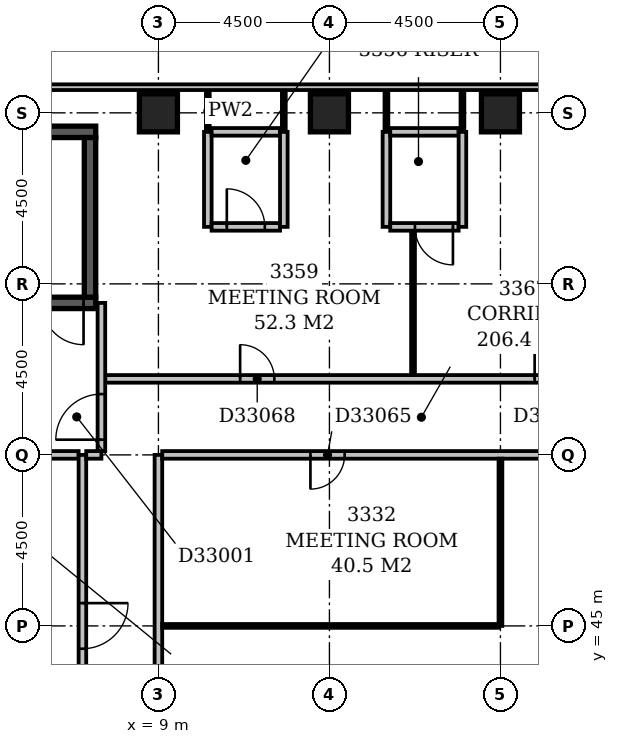
"""IFC4 building model, lengths in metres.
Left out: names, types, materials, properties, quantities, classifications, styles, units other than length and angle.
Written with IfcOpenShell. Run it as: python <this file> out.ifc"""

import sys

from ifc_helpers import new_model, si_unit, direction, frame, frame_2d, origin, origin_2d, place, context, subcontext, project, spatial, rectangle, extrude, element, fill, save


model = new_model("IFC4")
c1 = context("Model", 3, precision=1e-05, world=origin(), true_north=direction((0.0, 1.0)))
c2 = subcontext(c1, "Body", "Model", "MODEL_VIEW")
j1 = project(units=[si_unit("LENGTHUNIT", "METRE"), si_unit("PLANEANGLEUNIT", "RADIAN")], contexts=[c1])
p1 = place(None, origin())
s1 = spatial("IfcSite", under=j1, at=p1, CompositionType="ELEMENT")
p2 = place(p1, origin())
s2 = spatial("IfcBuilding", under=s1, at=p2, CompositionType="ELEMENT")
p3 = place(p2, frame((0.0, 0.0, 134.0)))
s3 = spatial("IfcBuildingStorey", under=s2, at=p3, CompositionType="ELEMENT", Elevation=134.0)
p4 = place(p3, frame((0.35, 53.5, -0.3), z_axis=(0.0, 0.0, 1.0), x_axis=(1.0, 0.0, 0.0)))
e1 = element("IfcWall", 1, at=p4, inside=s3, PredefinedType="SHEAR", context=c2, shape_type="SweptSolid", body=[
    extrude(rectangle(XDim=7.0, YDim=0.3, at=frame_2d((3.5, 0.0))), origin(), (0.0, 0.0, 1.0), 3.6),
])
p5 = place(p4, frame((5.58, 0.0, 0.3)))
e2 = element("IfcOpeningElement", 2, at=p5, cuts=e1, PredefinedType="OPENING", context=c2, shape_type="SweptSolid", body=[
    extrude(rectangle(XDim=1.1, YDim=2.1, at=frame_2d((0.55, 1.05))), frame((0.0, 0.162, 0.0), z_axis=(0.0, -1.0, 0.0), x_axis=(1.0, 0.0, 0.0)), (0.0, 0.0, 1.0), 0.324),
])
p6 = place(p3, frame((0.35, 58.0, -0.3), z_axis=(0.0, 0.0, 1.0), x_axis=(1.0, 0.0, 0.0)))
e3 = element("IfcWall", 3, at=p6, inside=s3, PredefinedType="SHEAR", context=c2, shape_type="SweptSolid", body=[
    extrude(rectangle(XDim=7.0, YDim=0.3, at=frame_2d((3.5, 0.0))), origin(), (0.0, 0.0, 1.0), 3.6),
])
p7 = place(p3, frame((7.2, 53.65, -0.3), z_axis=(0.0, 0.0, 1.0), x_axis=(0.0, 1.0, 0.0)))
e4 = element("IfcWall", 4, at=p7, inside=s3, PredefinedType="SHEAR", context=c2, shape_type="SweptSolid", body=[
    extrude(rectangle(XDim=4.2, YDim=0.3, at=frame_2d((2.1, 0.0))), origin(), (0.0, 0.0, 1.0), 3.6),
])
for number, where, z_axis, x_axis in (
    (5, (9.0, 58.5, -0.3), (0.0, 0.0, 1.0), (1.0, 0.0, 0.0)),
    (6, (13.5, 58.5, -0.3), (0.0, 0.0, 1.0), (1.0, 0.0, 0.0)),
    (7, (18.0, 58.5, -0.3), (0.0, 0.0, 1.0), (1.0, 0.0, 0.0)),
):
    element("IfcColumn", number, at=place(p3, frame(where, z_axis=z_axis, x_axis=x_axis)), inside=s3, PredefinedType="COLUMN", context=c2, shape_type="SweptSolid", body=[
        extrude(rectangle(XDim=1.0, YDim=1.0, at=origin_2d()), origin(), (0.0, 0.0, 1.0), 3.6),
    ])
p8 = place(p3, frame((68.1, 59.175, 0.0), z_axis=(0.0, 0.0, 1.0), x_axis=(-1.0, 0.0, 0.0)))
e8 = element("IfcWall", 8, at=p8, inside=s3, PredefinedType="STANDARD", context=c2, shape_type="SweptSolid", body=[
    extrude(rectangle(XDim=68.85, YDim=0.15, at=frame_2d((34.425, 0.0))), origin(), (0.0, 0.0, 1.0), 2.7),
])
p9 = place(p3, frame((7.0, 34.6, 0.0), z_axis=(0.0, 0.0, 1.0), x_axis=(0.0, 1.0, 0.0)))
e9 = element("IfcWall", 9, at=p9, inside=s3, PredefinedType="PARTITIONING", context=c2, shape_type="SweptSolid", body=[
    extrude(rectangle(XDim=14.9, YDim=0.2, at=frame_2d((7.45, 0.0))), origin(), (0.0, 0.0, 1.0), 3.3),
])
p10 = place(p9, frame((2.8, 0.0, 0.0)))
e10 = element("IfcOpeningElement", 10, at=p10, cuts=e9, PredefinedType="OPENING", context=c2, shape_type="SweptSolid", body=[
    extrude(rectangle(XDim=1.2, YDim=2.1, at=frame_2d((0.6, 1.05))), frame((0.0, 0.112, 0.0), z_axis=(0.0, -1.0, 0.0), x_axis=(1.0, 0.0, 0.0)), (0.0, 0.0, 1.0), 0.224),
])
p11 = place(p9, frame((9.8, 0.0, 0.0)))
e11 = element("IfcOpeningElement", 11, at=p11, cuts=e9, PredefinedType="OPENING", context=c2, shape_type="SweptSolid", body=[
    extrude(rectangle(XDim=1.2, YDim=2.1, at=frame_2d((0.6, 1.05))), frame((0.0, 0.112, 0.0), z_axis=(0.0, -1.0, 0.0), x_axis=(1.0, 0.0, 0.0)), (0.0, 0.0, 1.0), 0.224),
])
p12 = place(p3, frame((4.6, 49.5, 0.0), z_axis=(0.0, 0.0, 1.0), x_axis=(1.0, 0.0, 0.0)))
e12 = element("IfcWall", 12, at=p12, inside=s3, PredefinedType="PARTITIONING", context=c2, shape_type="SweptSolid", body=[
    extrude(rectangle(XDim=2.3, YDim=0.2, at=frame_2d((1.15, 0.0))), origin(), (0.0, 0.0, 1.0), 3.3),
])
p13 = place(p3, frame((7.1, 49.5, 0.0), z_axis=(0.0, 0.0, 1.0), x_axis=(1.0, 0.0, 0.0)))
e13 = element("IfcWall", 13, at=p13, inside=s3, PredefinedType="PARTITIONING", context=c2, shape_type="SweptSolid", body=[
    extrude(rectangle(XDim=0.4, YDim=0.2, at=frame_2d((0.2, 0.0))), origin(), (0.0, 0.0, 1.0), 3.3),
])
p14 = place(p3, frame((7.5, 49.6, 0.0), z_axis=(0.0, 0.0, 1.0), x_axis=(0.0, 1.0, 0.0)))
e14 = element("IfcWall", 14, at=p14, inside=s3, PredefinedType="PARTITIONING", context=c2, shape_type="SweptSolid", body=[
    extrude(rectangle(XDim=3.9, YDim=0.2, at=frame_2d((1.95, 0.0))), origin(), (0.0, 0.0, 1.0), 3.3),
])
p15 = place(p14, frame((0.3, 0.0, 0.0)))
e15 = element("IfcOpeningElement", 15, at=p15, cuts=e14, PredefinedType="OPENING", context=c2, shape_type="SweptSolid", body=[
    extrude(rectangle(XDim=1.2, YDim=2.1, at=frame_2d((0.6, 1.05))), frame((0.0, 0.112, 0.0), z_axis=(0.0, -1.0, 0.0), x_axis=(1.0, 0.0, 0.0)), (0.0, 0.0, 1.0), 0.224),
])
p16 = place(p3, frame((9.0, 34.75, 0.0), z_axis=(0.0, 0.0, 1.0), x_axis=(0.0, 1.0, 0.0)))
e16 = element("IfcWall", 16, at=p16, inside=s3, PredefinedType="PARTITIONING", context=c2, shape_type="SweptSolid", body=[
    extrude(rectangle(XDim=14.75, YDim=0.2, at=frame_2d((7.375, 0.0))), origin(), (0.0, 0.0, 1.0), 3.3),
])
p17 = place(p16, frame((5.25, 0.0, 0.0)))
e17 = element("IfcOpeningElement", 17, at=p17, cuts=e16, PredefinedType="OPENING", context=c2, shape_type="SweptSolid", body=[
    extrude(rectangle(XDim=0.9, YDim=2.1, at=frame_2d((0.45, 1.05))), frame((0.0, 0.112, 0.0), z_axis=(0.0, -1.0, 0.0), x_axis=(1.0, 0.0, 0.0)), (0.0, 0.0, 1.0), 0.224),
])
p18 = place(p3, frame((9.1, 45.0, 0.0), z_axis=(0.0, 0.0, 1.0), x_axis=(1.0, 0.0, 0.0)))
e18 = element("IfcWall", 18, at=p18, inside=s3, PredefinedType="PARTITIONING", context=c2, shape_type="SweptSolid", body=[
    extrude(rectangle(XDim=8.85, YDim=0.1, at=frame_2d((4.425, 0.0))), origin(), (0.0, 0.0, 1.0), 3.3),
])
p19 = place(p3, frame((18.0, 45.0, 0.0), z_axis=(0.0, 0.0, 1.0), x_axis=(0.0, 1.0, 0.0)))
e19 = element("IfcWall", 19, at=p19, inside=s3, PredefinedType="PARTITIONING", context=c2, shape_type="SweptSolid", body=[
    extrude(rectangle(XDim=4.4, YDim=0.1, at=frame_2d((2.2, 0.0))), origin(), (0.0, 0.0, 1.0), 3.3),
])
p20 = place(p3, frame((9.1, 49.5, 0.0), z_axis=(0.0, 0.0, 1.0), x_axis=(1.0, 0.0, 0.0)))
e20 = element("IfcWall", 20, at=p20, inside=s3, PredefinedType="PARTITIONING", context=c2, shape_type="SweptSolid", body=[
    extrude(rectangle(XDim=28.05, YDim=0.2, at=frame_2d((14.025, 0.0))), origin(), (0.0, 0.0, 1.0), 3.3),
])
p21 = place(p20, frame((20.0, 0.0, 0.0)))
e21 = element("IfcOpeningElement", 21, at=p21, cuts=e20, PredefinedType="OPENING", context=c2, shape_type="SweptSolid", body=[
    extrude(rectangle(XDim=1.0, YDim=2.1, at=frame_2d((0.5, 1.05))), frame((0.0, 0.112, 0.0), z_axis=(0.0, -1.0, 0.0), x_axis=(1.0, 0.0, 0.0)), (0.0, 0.0, 1.0), 0.224),
])
p22 = place(p20, frame((3.9, 0.0, 0.0)))
e22 = element("IfcOpeningElement", 22, at=p22, cuts=e20, PredefinedType="OPENING", context=c2, shape_type="SweptSolid", body=[
    extrude(rectangle(XDim=0.9, YDim=2.1, at=frame_2d((0.45, 1.05))), frame((0.0, 0.112, 0.0), z_axis=(0.0, -1.0, 0.0), x_axis=(1.0, 0.0, 0.0)), (0.0, 0.0, 1.0), 0.224),
])
p23 = place(p3, frame((7.6, 51.5, 0.0), z_axis=(0.0, 0.0, 1.0), x_axis=(1.0, 0.0, 0.0)))
e23 = element("IfcWall", 23, at=p23, inside=s3, PredefinedType="PARTITIONING", context=c2, shape_type="SweptSolid", body=[
    extrude(rectangle(XDim=15.3, YDim=0.2, at=frame_2d((7.65, 0.0))), origin(), (0.0, 0.0, 1.0), 3.3),
])
p24 = place(p23, frame((3.55, 0.0, 0.0)))
e24 = element("IfcOpeningElement", 24, at=p24, cuts=e23, PredefinedType="OPENING", context=c2, shape_type="SweptSolid", body=[
    extrude(rectangle(XDim=0.9, YDim=2.1, at=frame_2d((0.45, 1.05))), frame((0.0, 0.112, 0.0), z_axis=(0.0, -1.0, 0.0), x_axis=(1.0, 0.0, 0.0)), (0.0, 0.0, 1.0), 0.224),
])
p25 = place(p23, frame((11.3, 0.0, 0.0)))
e25 = element("IfcOpeningElement", 25, at=p25, cuts=e23, PredefinedType="OPENING", context=c2, shape_type="SweptSolid", body=[
    extrude(rectangle(XDim=0.9, YDim=2.1, at=frame_2d((0.45, 1.05))), frame((0.0, 0.112, 0.0), z_axis=(0.0, -1.0, 0.0), x_axis=(1.0, 0.0, 0.0)), (0.0, 0.0, 1.0), 0.224),
])
p26 = place(p3, frame((15.7, 51.6, 0.0), z_axis=(0.0, 0.0, 1.0), x_axis=(0.0, 1.0, 0.0)))
e26 = element("IfcWall", 26, at=p26, inside=s3, PredefinedType="PARTITIONING", context=c2, shape_type="SweptSolid", body=[
    extrude(rectangle(XDim=3.8, YDim=0.1, at=frame_2d((1.9, 0.0))), origin(), (0.0, 0.0, 1.0), 3.3),
])
p27 = place(p3, frame((10.3, 55.5, 0.0), z_axis=(0.0, 0.0, 1.0), x_axis=(0.0, 1.0, 0.0)))
e27 = element("IfcWall", 27, at=p27, inside=s3, PredefinedType="PARTITIONING", context=c2, shape_type="SweptSolid", body=[
    extrude(rectangle(XDim=2.5, YDim=0.2, at=frame_2d((1.25, 0.0))), origin(), (0.0, 0.0, 1.0), 3.3),
])
p28 = place(p3, frame((10.4, 55.5, 0.0), z_axis=(0.0, 0.0, 1.0), x_axis=(1.0, 0.0, 0.0)))
e28 = element("IfcWall", 28, at=p28, inside=s3, PredefinedType="PARTITIONING", context=c2, shape_type="SweptSolid", body=[
    extrude(rectangle(XDim=1.8, YDim=0.2, at=frame_2d((0.9, 0.0))), origin(), (0.0, 0.0, 1.0), 3.3),
])
p29 = place(p28, frame((0.4, 0.0, 0.0)))
e29 = element("IfcOpeningElement", 29, at=p29, cuts=e28, PredefinedType="OPENING", context=c2, shape_type="SweptSolid", body=[
    extrude(rectangle(XDim=1.0, YDim=2.1, at=frame_2d((0.5, 1.05))), frame((0.0, 0.112, 0.0), z_axis=(0.0, -1.0, 0.0), x_axis=(1.0, 0.0, 0.0)), (0.0, 0.0, 1.0), 0.224),
])
for number, where, z_axis, x_axis in (
    (30, (12.3, 55.5, 0.0), (0.0, 0.0, 1.0), (0.0, 1.0, 0.0)),
    (31, (15.0, 55.5, 0.0), (0.0, 0.0, 1.0), (0.0, 1.0, 0.0)),
):
    element("IfcWall", number, at=place(p3, frame(where, z_axis=z_axis, x_axis=x_axis)), inside=s3, PredefinedType="PARTITIONING", context=c2, shape_type="SweptSolid", body=[
        extrude(rectangle(XDim=2.5, YDim=0.2, at=frame_2d((1.25, 0.0))), origin(), (0.0, 0.0, 1.0), 3.3),
    ])
p30 = place(p3, frame((15.1, 55.5, 0.0), z_axis=(0.0, 0.0, 1.0), x_axis=(1.0, 0.0, 0.0)))
e32 = element("IfcWall", 32, at=p30, inside=s3, PredefinedType="PARTITIONING", context=c2, shape_type="SweptSolid", body=[
    extrude(rectangle(XDim=1.8, YDim=0.2, at=frame_2d((0.9, 0.0))), origin(), (0.0, 0.0, 1.0), 3.3),
])
p31 = place(p30, frame((0.65, 0.0, 0.0)))
e33 = element("IfcOpeningElement", 33, at=p31, cuts=e32, PredefinedType="OPENING", context=c2, shape_type="SweptSolid", body=[
    extrude(rectangle(XDim=1.0, YDim=2.1, at=frame_2d((0.5, 1.05))), frame((0.0, 0.112, 0.0), z_axis=(0.0, -1.0, 0.0), x_axis=(1.0, 0.0, 0.0)), (0.0, 0.0, 1.0), 0.224),
])
p32 = place(p3, frame((17.0, 55.5, 0.0), z_axis=(0.0, 0.0, 1.0), x_axis=(0.0, 1.0, 0.0)))
e34 = element("IfcWall", 34, at=p32, inside=s3, PredefinedType="PARTITIONING", context=c2, shape_type="SweptSolid", body=[
    extrude(rectangle(XDim=2.5, YDim=0.2, at=frame_2d((1.25, 0.0))), origin(), (0.0, 0.0, 1.0), 3.3),
])
p33 = place(p3, frame((10.3, 58.0, 0.0), z_axis=(0.0, 0.0, 1.0), x_axis=(0.0, 1.0, 0.0)))
e35 = element("IfcWall", 35, at=p33, inside=s3, PredefinedType="PARTITIONING", context=c2, shape_type="SweptSolid", body=[
    extrude(rectangle(XDim=1.1, YDim=0.1, at=frame_2d((0.55, 0.0))), origin(), (0.0, 0.0, 1.0), 3.3),
])
p34 = place(p3, frame((10.4, 58.0, 0.0), z_axis=(0.0, 0.0, 1.0), x_axis=(1.0, 0.0, 0.0)))
e36 = element("IfcWall", 36, at=p34, inside=s3, PredefinedType="PARTITIONING", context=c2, shape_type="SweptSolid", body=[
    extrude(rectangle(XDim=1.8, YDim=0.2, at=frame_2d((0.9, 0.0))), origin(), (0.0, 0.0, 1.0), 3.3),
])
for number, where, z_axis, x_axis in (
    (37, (12.3, 58.0, 0.0), (0.0, 0.0, 1.0), (0.0, 1.0, 0.0)),
    (38, (15.0, 58.0, 0.0), (0.0, 0.0, 1.0), (0.0, 1.0, 0.0)),
):
    element("IfcWall", number, at=place(p3, frame(where, z_axis=z_axis, x_axis=x_axis)), inside=s3, PredefinedType="PARTITIONING", context=c2, shape_type="SweptSolid", body=[
        extrude(rectangle(XDim=1.1, YDim=0.1, at=frame_2d((0.55, 0.0))), origin(), (0.0, 0.0, 1.0), 3.3),
    ])
p35 = place(p3, frame((15.1, 58.0, 0.0), z_axis=(0.0, 0.0, 1.0), x_axis=(1.0, 0.0, 0.0)))
e39 = element("IfcWall", 39, at=p35, inside=s3, PredefinedType="PARTITIONING", context=c2, shape_type="SweptSolid", body=[
    extrude(rectangle(XDim=1.8, YDim=0.2, at=frame_2d((0.9, 0.0))), origin(), (0.0, 0.0, 1.0), 3.3),
])
p36 = place(p3, frame((17.0, 58.0, 0.0), z_axis=(0.0, 0.0, 1.0), x_axis=(0.0, 1.0, 0.0)))
e40 = element("IfcWall", 40, at=p36, inside=s3, PredefinedType="PARTITIONING", context=c2, shape_type="SweptSolid", body=[
    extrude(rectangle(XDim=1.1, YDim=0.1, at=frame_2d((0.55, 0.0))), origin(), (0.0, 0.0, 1.0), 3.3),
])
p37 = place(p15, origin())
e41 = element("IfcDoor", 41, at=p37, inside=s3, OperationType="SINGLE_SWING_LEFT", PredefinedType="DOOR", context=c2, shape_type="SweptSolid", body=[
    extrude(rectangle(XDim=1.2, YDim=2.1, at=frame_2d((0.6, 1.05))), frame((0.0, 0.025, 0.0), z_axis=(0.0, -1.0, 0.0), x_axis=(1.0, 0.0, 0.0)), (0.0, 0.0, 1.0), 0.05),
])
fill(e15, e41)
p38 = place(p11, origin())
e42 = element("IfcDoor", 42, at=p38, inside=s3, OperationType="SINGLE_SWING_RIGHT", PredefinedType="DOOR", context=c2, shape_type="SweptSolid", body=[
    extrude(rectangle(XDim=1.2, YDim=2.1, at=frame_2d((0.6, 1.05))), frame((0.0, 0.025, 0.0), z_axis=(0.0, -1.0, 0.0), x_axis=(1.0, 0.0, 0.0)), (0.0, 0.0, 1.0), 0.05),
])
fill(e11, e42)
p39 = place(p5, origin())
e43 = element("IfcDoor", 43, at=p39, inside=s3, OperationType="SINGLE_SWING_RIGHT", PredefinedType="DOOR", context=c2, shape_type="SweptSolid", body=[
    extrude(rectangle(XDim=1.1, YDim=2.1, at=frame_2d((0.55, 1.05))), frame((0.0, 0.025, 0.0), z_axis=(0.0, -1.0, 0.0), x_axis=(1.0, 0.0, 0.0)), (0.0, 0.0, 1.0), 0.05),
])
fill(e2, e43)
p40 = place(p22, frame((0.9, 0.0, 0.0), z_axis=(0.0, 0.0, 1.0), x_axis=(-1.0, 0.0, 0.0)))
e44 = element("IfcDoor", 44, at=p40, inside=s3, OperationType="SINGLE_SWING_RIGHT", PredefinedType="DOOR", context=c2, shape_type="SweptSolid", body=[
    extrude(rectangle(XDim=0.9, YDim=2.1, at=frame_2d((0.45, 1.05))), frame((0.0, 0.025, 0.0), z_axis=(0.0, -1.0, 0.0), x_axis=(1.0, 0.0, 0.0)), (0.0, 0.0, 1.0), 0.05),
])
fill(e22, e44)
p41 = place(p24, origin())
e45 = element("IfcDoor", 45, at=p41, inside=s3, OperationType="SINGLE_SWING_LEFT", PredefinedType="DOOR", context=c2, shape_type="SweptSolid", body=[
    extrude(rectangle(XDim=0.9, YDim=2.1, at=frame_2d((0.45, 1.05))), frame((0.0, 0.025, 0.0), z_axis=(0.0, -1.0, 0.0), x_axis=(1.0, 0.0, 0.0)), (0.0, 0.0, 1.0), 0.05),
])
fill(e24, e45)
p42 = place(p25, origin())
e46 = element("IfcDoor", 46, at=p42, inside=s3, OperationType="SINGLE_SWING_LEFT", PredefinedType="DOOR", context=c2, shape_type="SweptSolid", body=[
    extrude(rectangle(XDim=0.9, YDim=2.1, at=frame_2d((0.45, 1.05))), frame((0.0, 0.025, 0.0), z_axis=(0.0, -1.0, 0.0), x_axis=(1.0, 0.0, 0.0)), (0.0, 0.0, 1.0), 0.05),
])
fill(e25, e46)
p43 = place(p29, origin())
e47 = element("IfcDoor", 47, at=p43, inside=s3, OperationType="SINGLE_SWING_LEFT", PredefinedType="DOOR", context=c2, shape_type="SweptSolid", body=[
    extrude(rectangle(XDim=1.0, YDim=2.1, at=frame_2d((0.5, 1.05))), frame((0.0, 0.025, 0.0), z_axis=(0.0, -1.0, 0.0), x_axis=(1.0, 0.0, 0.0)), (0.0, 0.0, 1.0), 0.05),
])
fill(e29, e47)
p44 = place(p31, origin())
e48 = element("IfcDoor", 48, at=p44, inside=s3, OperationType="SINGLE_SWING_RIGHT", PredefinedType="DOOR", context=c2, shape_type="SweptSolid", body=[
    extrude(rectangle(XDim=1.0, YDim=2.1, at=frame_2d((0.5, 1.05))), frame((0.0, 0.025, 0.0), z_axis=(0.0, -1.0, 0.0), x_axis=(1.0, 0.0, 0.0)), (0.0, 0.0, 1.0), 0.05),
])
fill(e33, e48)
save(model, sys.argv[1])
